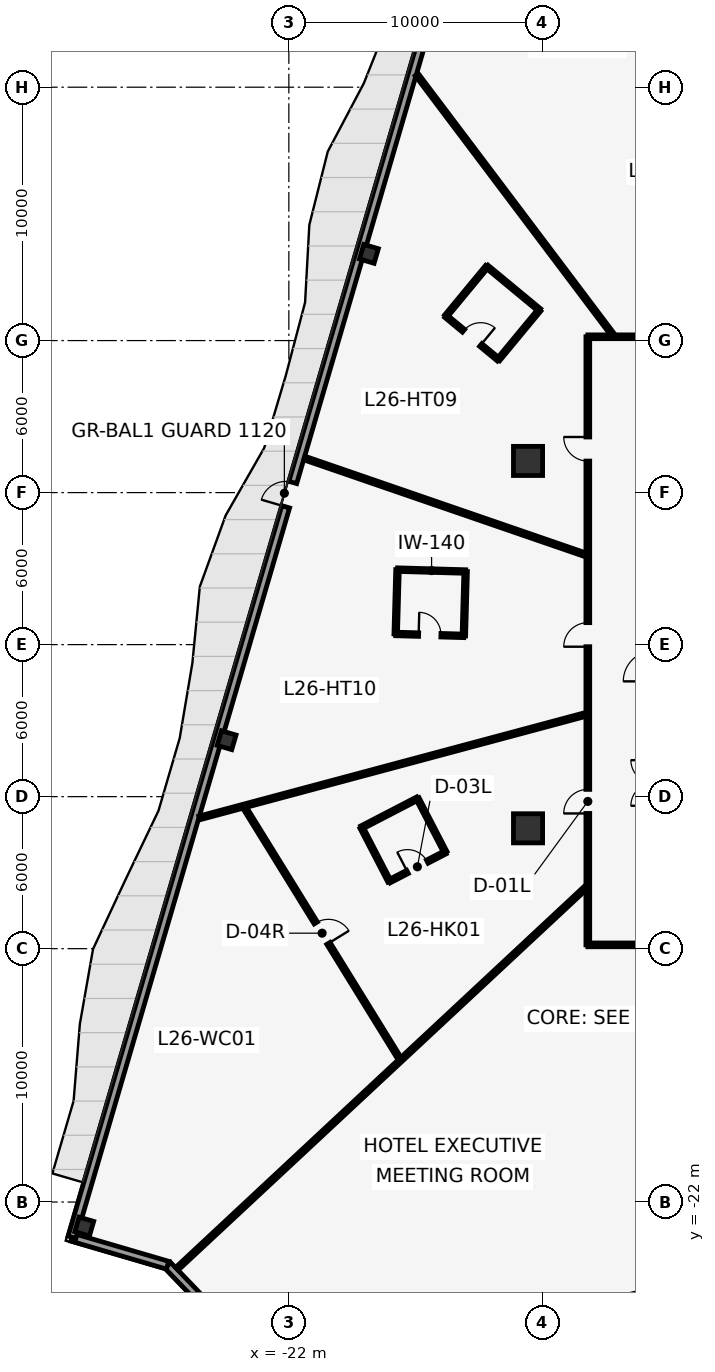
"""IFC4 building model, lengths in metres.
Left out: names, types, materials, properties, quantities, classifications, styles, units other than length and angle.
Written with IfcOpenShell. Run it as: python <this file> out.ifc"""

import sys

from ifc_helpers import new_model, si_unit, direction, frame, frame_2d, origin, origin_2d, place, context, subcontext, project, spatial, rectangle, hollow_rectangle, extrude, element, fill, save


model = new_model("IFC4")
c1 = context("Model", 3, precision=1e-05, world=origin(), true_north=direction((0.0, 1.0)))
c2 = subcontext(c1, "Body", "Model", "MODEL_VIEW")
j1 = project(units=[si_unit("LENGTHUNIT", "METRE"), si_unit("PLANEANGLEUNIT", "RADIAN")], contexts=[c1])
p1 = place(None, origin())
s1 = spatial("IfcSite", under=j1, at=p1, CompositionType="ELEMENT")
p2 = place(p1, origin())
s2 = spatial("IfcBuilding", under=s1, at=p2, CompositionType="ELEMENT")
p3 = place(p2, frame((0.0, 0.0, 115.0)))
s3 = spatial("IfcBuildingStorey", under=s2, at=p3, CompositionType="ELEMENT", Elevation=115.0)
for number, where, z_axis, x_axis in (
    (1, (-12.56, -7.25, 0.0), (0.0, 0.0, 1.0), (1.0, 0.0, 0.0)),
    (2, (-12.56, 7.25, 0.0), (0.0, 0.0, 1.0), (1.0, 0.0, 0.0)),
):
    element("IfcColumn", number, at=place(p3, frame(where, z_axis=z_axis, x_axis=x_axis)), inside=s3, PredefinedType="COLUMN", context=c2, shape_type="SweptSolid", body=[
        extrude(rectangle(XDim=1.15, YDim=1.15, at=origin_2d()), origin(), (0.0, 0.0, 1.0), 4.0),
    ])
for number, where, z_axis, x_axis in (
    (3, (-18.839, 15.422, 0.0), (0.0, 0.0, 1.0), (0.281, 0.96, 0.0)),
    (4, (-24.457, -3.773, 0.0), (0.0, 0.0, 1.0), (0.281, 0.96, 0.0)),
    (5, (-30.075, -22.967, 0.0), (0.0, 0.0, 1.0), (0.281, 0.96, 0.0)),
):
    element("IfcColumn", number, at=place(p3, frame(where, z_axis=z_axis, x_axis=x_axis)), inside=s3, PredefinedType="COLUMN", context=c2, shape_type="SweptSolid", body=[
        extrude(hollow_rectangle(XDim=0.6, YDim=0.6, WallThickness=0.04, at=origin_2d()), origin(), (0.0, 0.0, 1.0), 4.0),
    ])
p4 = place(p3, frame((35.546, -14.818, 0.0), z_axis=(0.0, 0.0, 1.0), x_axis=(-0.970295883146, -0.241921266428, 0.0)))
e6 = element("IfcWall", 6, at=p4, inside=s3, PredefinedType="STANDARD", context=c2, shape_type="SweptSolid", body=[
    extrude(rectangle(XDim=61.811, YDim=0.32, at=frame_2d((30.905, 0.0))), origin(), (0.0, 0.0, 1.0), 3.75),
])
p5 = place(p4, frame((22.988, 0.0, 0.0)))
e7 = element("IfcOpeningElement", 7, at=p5, cuts=e6, PredefinedType="OPENING", context=c2, shape_type="SweptSolid", body=[
    extrude(rectangle(XDim=1.0, YDim=2.15, at=frame_2d((0.5, 1.075))), frame((0.0, 0.17, 0.0), z_axis=(0.0, -1.0, 0.0), x_axis=(1.0, 0.0, 0.0)), (0.0, 0.0, 1.0), 0.34),
])
p6 = place(p3, frame((-25.38, -25.956, 0.0), z_axis=(0.0, 0.0, 1.0), x_axis=(-0.69281750058, 0.721112966802, 0.0)))
e8 = element("IfcWall", 8, at=p6, inside=s3, PredefinedType="STANDARD", context=c2, shape_type="SweptSolid", body=[
    extrude(rectangle(XDim=2.028, YDim=0.32, at=frame_2d((1.014, 0.0))), origin(), (0.0, 0.0, 1.0), 3.75),
])
p7 = place(p3, frame((-26.785, -24.494, 0.0), z_axis=(0.0, 0.0, 1.0), x_axis=(-0.959768832583, 0.28079136027, 0.0)))
e9 = element("IfcWall", 9, at=p7, inside=s3, PredefinedType="STANDARD", context=c2, shape_type="SweptSolid", body=[
    extrude(rectangle(XDim=3.933, YDim=0.32, at=frame_2d((1.966, 0.0))), origin(), (0.0, 0.0, 1.0), 3.75),
])
p8 = place(p3, frame((-30.559, -23.389, 0.0), z_axis=(0.0, 0.0, 1.0), x_axis=(0.280769703207, 0.95977516834, 0.0)))
e10 = element("IfcWall", 10, at=p8, inside=s3, PredefinedType="STANDARD", context=c2, shape_type="SweptSolid", body=[
    extrude(rectangle(XDim=61.076, YDim=0.32, at=frame_2d((30.538, 0.0))), origin(), (0.0, 0.0, 1.0), 3.75),
])
p9 = place(p8, frame((30.038, 0.0, 0.0)))
e11 = element("IfcOpeningElement", 11, at=p9, cuts=e10, PredefinedType="OPENING", context=c2, shape_type="SweptSolid", body=[
    extrude(rectangle(XDim=1.0, YDim=2.15, at=frame_2d((0.5, 1.075))), frame((0.0, 0.17, 0.0), z_axis=(0.0, -1.0, 0.0), x_axis=(1.0, 0.0, 0.0)), (0.0, 0.0, 1.0), 0.34),
])
p10 = place(p3, frame((-10.2, 12.15, 0.0), z_axis=(0.0, 0.0, 1.0), x_axis=(1.0, 0.0, 0.0)))
e12 = element("IfcWall", 12, at=p10, inside=s3, PredefinedType="PARTITIONING", context=c2, shape_type="SweptSolid", body=[
    extrude(rectangle(XDim=20.4, YDim=0.15, at=frame_2d((10.2, 0.0))), origin(), (0.0, 0.0, 1.0), 3.75),
])
p11 = place(p10, frame((13.081, 0.0, 0.0)))
e13 = element("IfcOpeningElement", 13, at=p11, cuts=e12, PredefinedType="OPENING", context=c2, shape_type="SweptSolid", body=[
    extrude(rectangle(XDim=0.95, YDim=2.15, at=frame_2d((0.475, 1.075))), frame((0.0, 0.085, 0.0), z_axis=(0.0, -1.0, 0.0), x_axis=(1.0, 0.0, 0.0)), (0.0, 0.0, 1.0), 0.17),
])
p12 = place(p10, frame((4.788, 0.0, 0.0)))
e14 = element("IfcOpeningElement", 14, at=p12, cuts=e12, PredefinedType="OPENING", context=c2, shape_type="SweptSolid", body=[
    extrude(rectangle(XDim=0.95, YDim=2.15, at=frame_2d((0.475, 1.075))), frame((0.0, 0.085, 0.0), z_axis=(0.0, -1.0, 0.0), x_axis=(1.0, 0.0, 0.0)), (0.0, 0.0, 1.0), 0.17),
])
p13 = place(p3, frame((10.2, -11.85, 0.0), z_axis=(0.0, 0.0, 1.0), x_axis=(-1.0, 0.0, 0.0)))
e15 = element("IfcWall", 15, at=p13, inside=s3, PredefinedType="PARTITIONING", context=c2, shape_type="SweptSolid", body=[
    extrude(rectangle(XDim=20.4, YDim=0.15, at=frame_2d((10.2, 0.0))), origin(), (0.0, 0.0, 1.0), 3.75),
])
p14 = place(p13, frame((16.522, 0.0, 0.0)))
e16 = element("IfcOpeningElement", 16, at=p14, cuts=e15, PredefinedType="OPENING", context=c2, shape_type="SweptSolid", body=[
    extrude(rectangle(XDim=0.95, YDim=2.15, at=frame_2d((0.475, 1.075))), frame((0.0, 0.085, 0.0), z_axis=(0.0, -1.0, 0.0), x_axis=(1.0, 0.0, 0.0)), (0.0, 0.0, 1.0), 0.17),
])
p15 = place(p13, frame((10.172, 0.0, 0.0)))
e17 = element("IfcOpeningElement", 17, at=p15, cuts=e15, PredefinedType="OPENING", context=c2, shape_type="SweptSolid", body=[
    extrude(rectangle(XDim=0.95, YDim=2.15, at=frame_2d((0.475, 1.075))), frame((0.0, 0.085, 0.0), z_axis=(0.0, -1.0, 0.0), x_axis=(1.0, 0.0, 0.0)), (0.0, 0.0, 1.0), 0.17),
])
p16 = place(p13, frame((3.375, 0.0, 0.0)))
e18 = element("IfcOpeningElement", 18, at=p16, cuts=e15, PredefinedType="OPENING", context=c2, shape_type="SweptSolid", body=[
    extrude(rectangle(XDim=0.95, YDim=2.15, at=frame_2d((0.475, 1.075))), frame((0.0, 0.085, 0.0), z_axis=(0.0, -1.0, 0.0), x_axis=(1.0, 0.0, 0.0)), (0.0, 0.0, 1.0), 0.17),
])
p17 = place(p3, frame((-10.2, -11.85, 0.0), z_axis=(0.0, 0.0, 1.0), x_axis=(0.0, 1.0, 0.0)))
e19 = element("IfcWall", 19, at=p17, inside=s3, PredefinedType="PARTITIONING", context=c2, shape_type="SweptSolid", body=[
    extrude(rectangle(XDim=24.0, YDim=0.15, at=frame_2d((12.0, 0.0))), origin(), (0.0, 0.0, 1.0), 3.75),
])
p18 = place(p17, frame((5.187, 0.0, 0.0)))
e20 = element("IfcOpeningElement", 20, at=p18, cuts=e19, PredefinedType="OPENING", context=c2, shape_type="SweptSolid", body=[
    extrude(rectangle(XDim=0.95, YDim=2.15, at=frame_2d((0.475, 1.075))), frame((0.0, 0.085, 0.0), z_axis=(0.0, -1.0, 0.0), x_axis=(1.0, 0.0, 0.0)), (0.0, 0.0, 1.0), 0.17),
])
p19 = place(p17, frame((19.094, 0.0, 0.0)))
e21 = element("IfcOpeningElement", 21, at=p19, cuts=e19, PredefinedType="OPENING", context=c2, shape_type="SweptSolid", body=[
    extrude(rectangle(XDim=0.95, YDim=2.15, at=frame_2d((0.475, 1.075))), frame((0.0, 0.085, 0.0), z_axis=(0.0, -1.0, 0.0), x_axis=(1.0, 0.0, 0.0)), (0.0, 0.0, 1.0), 0.17),
])
p20 = place(p17, frame((11.767, 0.0, 0.0)))
e22 = element("IfcOpeningElement", 22, at=p20, cuts=e19, PredefinedType="OPENING", context=c2, shape_type="SweptSolid", body=[
    extrude(rectangle(XDim=0.95, YDim=2.15, at=frame_2d((0.475, 1.075))), frame((0.0, 0.085, 0.0), z_axis=(0.0, -1.0, 0.0), x_axis=(1.0, 0.0, 0.0)), (0.0, 0.0, 1.0), 0.17),
])
p21 = place(p3, frame((-9.235, 12.255, 0.0), z_axis=(0.0, 0.0, 1.0), x_axis=(-0.60180765782, 0.79864106017, 0.0)))
e23 = element("IfcWall", 23, at=p21, inside=s3, PredefinedType="PARTITIONING", context=c2, shape_type="SweptSolid", body=[
    extrude(rectangle(XDim=12.825, YDim=0.15, at=frame_2d((6.413, 0.0))), origin(), (0.0, 0.0, 1.0), 3.75),
])
p22 = place(p3, frame((-10.305, 3.548, 0.0), z_axis=(0.0, 0.0, 1.0), x_axis=(-0.945517077529, 0.325572505138, 0.0)))
e24 = element("IfcWall", 24, at=p22, inside=s3, PredefinedType="PARTITIONING", context=c2, shape_type="SweptSolid", body=[
    extrude(rectangle(XDim=11.714, YDim=0.15, at=frame_2d((5.857, 0.0))), origin(), (0.0, 0.0, 1.0), 3.75),
])
p23 = place(p3, frame((-10.305, -2.761, 0.0), z_axis=(0.0, 0.0, 1.0), x_axis=(-0.965926903589, -0.258815024531, 0.0)))
e25 = element("IfcWall", 25, at=p23, inside=s3, PredefinedType="PARTITIONING", context=c2, shape_type="SweptSolid", body=[
    extrude(rectangle(XDim=15.768, YDim=0.15, at=frame_2d((7.884, 0.0))), origin(), (0.0, 0.0, 1.0), 3.75),
])
p24 = place(p3, frame((-10.305, -9.61, 0.0), z_axis=(0.0, 0.0, 1.0), x_axis=(-0.731358223389, -0.681993511026, 0.0)))
e26 = element("IfcWall", 26, at=p24, inside=s3, PredefinedType="PARTITIONING", context=c2, shape_type="SweptSolid", body=[
    extrude(rectangle(XDim=22.023, YDim=0.15, at=frame_2d((11.011, 0.0))), origin(), (0.0, 0.0, 1.0), 3.75),
])
p25 = place(p3, frame((-23.771, -6.396, 0.0), z_axis=(0.0, 0.0, 1.0), x_axis=(0.525453466411, -0.850822340232, 0.0)))
e27 = element("IfcWall", 27, at=p25, inside=s3, PredefinedType="PARTITIONING", context=c2, shape_type="SweptSolid", body=[
    extrude(rectangle(XDim=11.737, YDim=0.15, at=frame_2d((5.869, 0.0))), origin(), (0.0, 0.0, 1.0), 3.75),
])
p26 = place(p25, frame((5.394, 0.0, 0.0)))
e28 = element("IfcOpeningElement", 28, at=p26, cuts=e27, PredefinedType="OPENING", context=c2, shape_type="SweptSolid", body=[
    extrude(rectangle(XDim=0.95, YDim=2.15, at=frame_2d((0.475, 1.075))), frame((0.0, 0.085, 0.0), z_axis=(0.0, -1.0, 0.0), x_axis=(1.0, 0.0, 0.0)), (0.0, 0.0, 1.0), 0.17),
])
p27 = place(p3, frame((-16.922, -6.073, 0.0), z_axis=(0.0, 0.0, 1.0), x_axis=(-0.887781243054, -0.460265645559, 0.0)))
e29 = element("IfcWall", 29, at=p27, inside=s3, PredefinedType="PARTITIONING", context=c2, shape_type="SweptSolid", body=[
    extrude(rectangle(XDim=2.49, YDim=0.14, at=frame_2d((1.245, 0.0))), origin(), (0.0, 0.0, 1.0), 3.75),
])
p28 = place(p3, frame((-19.132, -7.219, 0.0), z_axis=(0.0, 0.0, 1.0), x_axis=(0.460200871333, -0.887814821922, 0.0)))
e30 = element("IfcWall", 30, at=p28, inside=s3, PredefinedType="PARTITIONING", context=c2, shape_type="SweptSolid", body=[
    extrude(rectangle(XDim=2.39, YDim=0.14, at=frame_2d((1.195, 0.0))), origin(), (0.0, 0.0, 1.0), 3.75),
])
p29 = place(p3, frame((-18.032, -9.341, 0.0), z_axis=(0.0, 0.0, 1.0), x_axis=(0.887821307868, 0.460188358496, 0.0)))
e31 = element("IfcWall", 31, at=p29, inside=s3, PredefinedType="PARTITIONING", context=c2, shape_type="SweptSolid", body=[
    extrude(rectangle(XDim=2.49, YDim=0.14, at=frame_2d((1.245, 0.0))), origin(), (0.0, 0.0, 1.0), 3.75),
])
p30 = place(p29, frame((0.805, 0.0, 0.0)))
e32 = element("IfcOpeningElement", 32, at=p30, cuts=e31, PredefinedType="OPENING", context=c2, shape_type="SweptSolid", body=[
    extrude(rectangle(XDim=0.88, YDim=2.1, at=frame_2d((0.44, 1.05))), frame((0.0, 0.08, 0.0), z_axis=(0.0, -1.0, 0.0), x_axis=(1.0, 0.0, 0.0)), (0.0, 0.0, 1.0), 0.16),
])
p31 = place(p3, frame((-15.822, -8.196, 0.0), z_axis=(0.0, 0.0, 1.0), x_axis=(-0.460159137491, 0.887836453511, 0.0)))
e33 = element("IfcWall", 33, at=p31, inside=s3, PredefinedType="PARTITIONING", context=c2, shape_type="SweptSolid", body=[
    extrude(rectangle(XDim=2.39, YDim=0.14, at=frame_2d((1.195, 0.0))), origin(), (0.0, 0.0, 1.0), 3.75),
])
p32 = place(p3, frame((-12.11, 13.207, 0.0), z_axis=(0.0, 0.0, 1.0), x_axis=(-0.770537260361, 0.637394956362, 0.0)))
e34 = element("IfcWall", 34, at=p32, inside=s3, PredefinedType="PARTITIONING", context=c2, shape_type="SweptSolid", body=[
    extrude(rectangle(XDim=2.69, YDim=0.14, at=frame_2d((1.345, 0.0))), origin(), (0.0, 0.0, 1.0), 3.75),
])
p33 = place(p3, frame((-14.183, 14.921, 0.0), z_axis=(0.0, 0.0, 1.0), x_axis=(-0.63745754777, -0.770485479935, 0.0)))
e35 = element("IfcWall", 35, at=p33, inside=s3, PredefinedType="PARTITIONING", context=c2, shape_type="SweptSolid", body=[
    extrude(rectangle(XDim=2.54, YDim=0.14, at=frame_2d((1.27, 0.0))), origin(), (0.0, 0.0, 1.0), 3.75),
])
p34 = place(p3, frame((-15.802, 12.964, 0.0), z_axis=(0.0, 0.0, 1.0), x_axis=(0.770537260361, -0.637394956362, 0.0)))
e36 = element("IfcWall", 36, at=p34, inside=s3, PredefinedType="PARTITIONING", context=c2, shape_type="SweptSolid", body=[
    extrude(rectangle(XDim=2.69, YDim=0.14, at=frame_2d((1.345, 0.0))), origin(), (0.0, 0.0, 1.0), 3.75),
])
p35 = place(p34, frame((0.905, 0.0, 0.0)))
e37 = element("IfcOpeningElement", 37, at=p35, cuts=e36, PredefinedType="OPENING", context=c2, shape_type="SweptSolid", body=[
    extrude(rectangle(XDim=0.88, YDim=2.1, at=frame_2d((0.44, 1.05))), frame((0.0, 0.08, 0.0), z_axis=(0.0, -1.0, 0.0), x_axis=(1.0, 0.0, 0.0)), (0.0, 0.0, 1.0), 0.16),
])
p36 = place(p3, frame((-13.729, 11.25, 0.0), z_axis=(0.0, 0.0, 1.0), x_axis=(0.63745754777, 0.770485479935, 0.0)))
e38 = element("IfcWall", 38, at=p36, inside=s3, PredefinedType="PARTITIONING", context=c2, shape_type="SweptSolid", body=[
    extrude(rectangle(XDim=2.54, YDim=0.14, at=frame_2d((1.27, 0.0))), origin(), (0.0, 0.0, 1.0), 3.75),
])
p37 = place(p3, frame((-15.022, 2.885, 0.0), z_axis=(0.0, 0.0, 1.0), x_axis=(-0.999609225093, 0.027953481145, 0.0)))
e39 = element("IfcWall", 39, at=p37, inside=s3, PredefinedType="PARTITIONING", context=c2, shape_type="SweptSolid", body=[
    extrude(rectangle(XDim=2.69, YDim=0.14, at=frame_2d((1.345, 0.0))), origin(), (0.0, 0.0, 1.0), 3.75),
])
p38 = place(p3, frame((-17.711, 2.96, 0.0), z_axis=(0.0, 0.0, 1.0), x_axis=(-0.027873780836, -0.999611450686, 0.0)))
e40 = element("IfcWall", 40, at=p38, inside=s3, PredefinedType="PARTITIONING", context=c2, shape_type="SweptSolid", body=[
    extrude(rectangle(XDim=2.54, YDim=0.14, at=frame_2d((1.27, 0.0))), origin(), (0.0, 0.0, 1.0), 3.75),
])
p39 = place(p3, frame((-17.782, 0.421, 0.0), z_axis=(0.0, 0.0, 1.0), x_axis=(0.999609225093, -0.027953481145, 0.0)))
e41 = element("IfcWall", 41, at=p39, inside=s3, PredefinedType="PARTITIONING", context=c2, shape_type="SweptSolid", body=[
    extrude(rectangle(XDim=2.69, YDim=0.14, at=frame_2d((1.345, 0.0))), origin(), (0.0, 0.0, 1.0), 3.75),
])
p40 = place(p39, frame((0.905, 0.0, 0.0)))
e42 = element("IfcOpeningElement", 42, at=p40, cuts=e41, PredefinedType="OPENING", context=c2, shape_type="SweptSolid", body=[
    extrude(rectangle(XDim=0.88, YDim=2.1, at=frame_2d((0.44, 1.05))), frame((0.0, 0.08, 0.0), z_axis=(0.0, -1.0, 0.0), x_axis=(1.0, 0.0, 0.0)), (0.0, 0.0, 1.0), 0.16),
])
p41 = place(p3, frame((-15.093, 0.345, 0.0), z_axis=(0.0, 0.0, 1.0), x_axis=(0.027873780836, 0.999611450686, 0.0)))
e43 = element("IfcWall", 43, at=p41, inside=s3, PredefinedType="PARTITIONING", context=c2, shape_type="SweptSolid", body=[
    extrude(rectangle(XDim=2.54, YDim=0.14, at=frame_2d((1.27, 0.0))), origin(), (0.0, 0.0, 1.0), 3.75),
])
p42 = place(p9, origin())
e44 = element("IfcDoor", 44, at=p42, inside=s3, OperationType="SINGLE_SWING_LEFT", PredefinedType="DOOR", context=c2, shape_type="SweptSolid", body=[
    extrude(rectangle(XDim=1.0, YDim=2.15, at=frame_2d((0.5, 1.075))), frame((0.0, 0.025, 0.0), z_axis=(0.0, -1.0, 0.0), x_axis=(1.0, 0.0, 0.0)), (0.0, 0.0, 1.0), 0.05),
])
fill(e11, e44)
p43 = place(p26, origin())
e45 = element("IfcDoor", 45, at=p43, inside=s3, OperationType="SINGLE_SWING_RIGHT", PredefinedType="DOOR", context=c2, shape_type="SweptSolid", body=[
    extrude(rectangle(XDim=0.95, YDim=2.15, at=frame_2d((0.475, 1.075))), frame((0.0, 0.025, 0.0), z_axis=(0.0, -1.0, 0.0), x_axis=(1.0, 0.0, 0.0)), (0.0, 0.0, 1.0), 0.05),
])
fill(e28, e45)
p44 = place(p30, origin())
e46 = element("IfcDoor", 46, at=p44, inside=s3, OperationType="SINGLE_SWING_LEFT", PredefinedType="DOOR", context=c2, shape_type="SweptSolid", body=[
    extrude(rectangle(XDim=0.88, YDim=2.1, at=frame_2d((0.44, 1.05))), frame((0.0, 0.025, 0.0), z_axis=(0.0, -1.0, 0.0), x_axis=(1.0, 0.0, 0.0)), (0.0, 0.0, 1.0), 0.05),
])
fill(e32, e46)
p45 = place(p35, origin())
e47 = element("IfcDoor", 47, at=p45, inside=s3, OperationType="SINGLE_SWING_RIGHT", PredefinedType="DOOR", context=c2, shape_type="SweptSolid", body=[
    extrude(rectangle(XDim=0.88, YDim=2.1, at=frame_2d((0.44, 1.05))), frame((0.0, 0.025, 0.0), z_axis=(0.0, -1.0, 0.0), x_axis=(1.0, 0.0, 0.0)), (0.0, 0.0, 1.0), 0.05),
])
fill(e37, e47)
p46 = place(p40, origin())
e48 = element("IfcDoor", 48, at=p46, inside=s3, OperationType="SINGLE_SWING_LEFT", PredefinedType="DOOR", context=c2, shape_type="SweptSolid", body=[
    extrude(rectangle(XDim=0.88, YDim=2.1, at=frame_2d((0.44, 1.05))), frame((0.0, 0.025, 0.0), z_axis=(0.0, -1.0, 0.0), x_axis=(1.0, 0.0, 0.0)), (0.0, 0.0, 1.0), 0.05),
])
fill(e42, e48)
p47 = place(p18, origin())
e49 = element("IfcDoor", 49, at=p47, inside=s3, OperationType="SINGLE_SWING_LEFT", PredefinedType="DOOR", context=c2, shape_type="SweptSolid", body=[
    extrude(rectangle(XDim=0.95, YDim=2.15, at=frame_2d((0.475, 1.075))), frame((0.0, 0.025, 0.0), z_axis=(0.0, -1.0, 0.0), x_axis=(1.0, 0.0, 0.0)), (0.0, 0.0, 1.0), 0.05),
])
fill(e20, e49)
p48 = place(p19, origin())
e50 = element("IfcDoor", 50, at=p48, inside=s3, OperationType="SINGLE_SWING_RIGHT", PredefinedType="DOOR", context=c2, shape_type="SweptSolid", body=[
    extrude(rectangle(XDim=0.95, YDim=2.15, at=frame_2d((0.475, 1.075))), frame((0.0, 0.025, 0.0), z_axis=(0.0, -1.0, 0.0), x_axis=(1.0, 0.0, 0.0)), (0.0, 0.0, 1.0), 0.05),
])
fill(e21, e50)
p49 = place(p20, origin())
e51 = element("IfcDoor", 51, at=p49, inside=s3, OperationType="SINGLE_SWING_LEFT", PredefinedType="DOOR", context=c2, shape_type="SweptSolid", body=[
    extrude(rectangle(XDim=0.95, YDim=2.15, at=frame_2d((0.475, 1.075))), frame((0.0, 0.025, 0.0), z_axis=(0.0, -1.0, 0.0), x_axis=(1.0, 0.0, 0.0)), (0.0, 0.0, 1.0), 0.05),
])
fill(e22, e51)
save(model, sys.argv[1])
